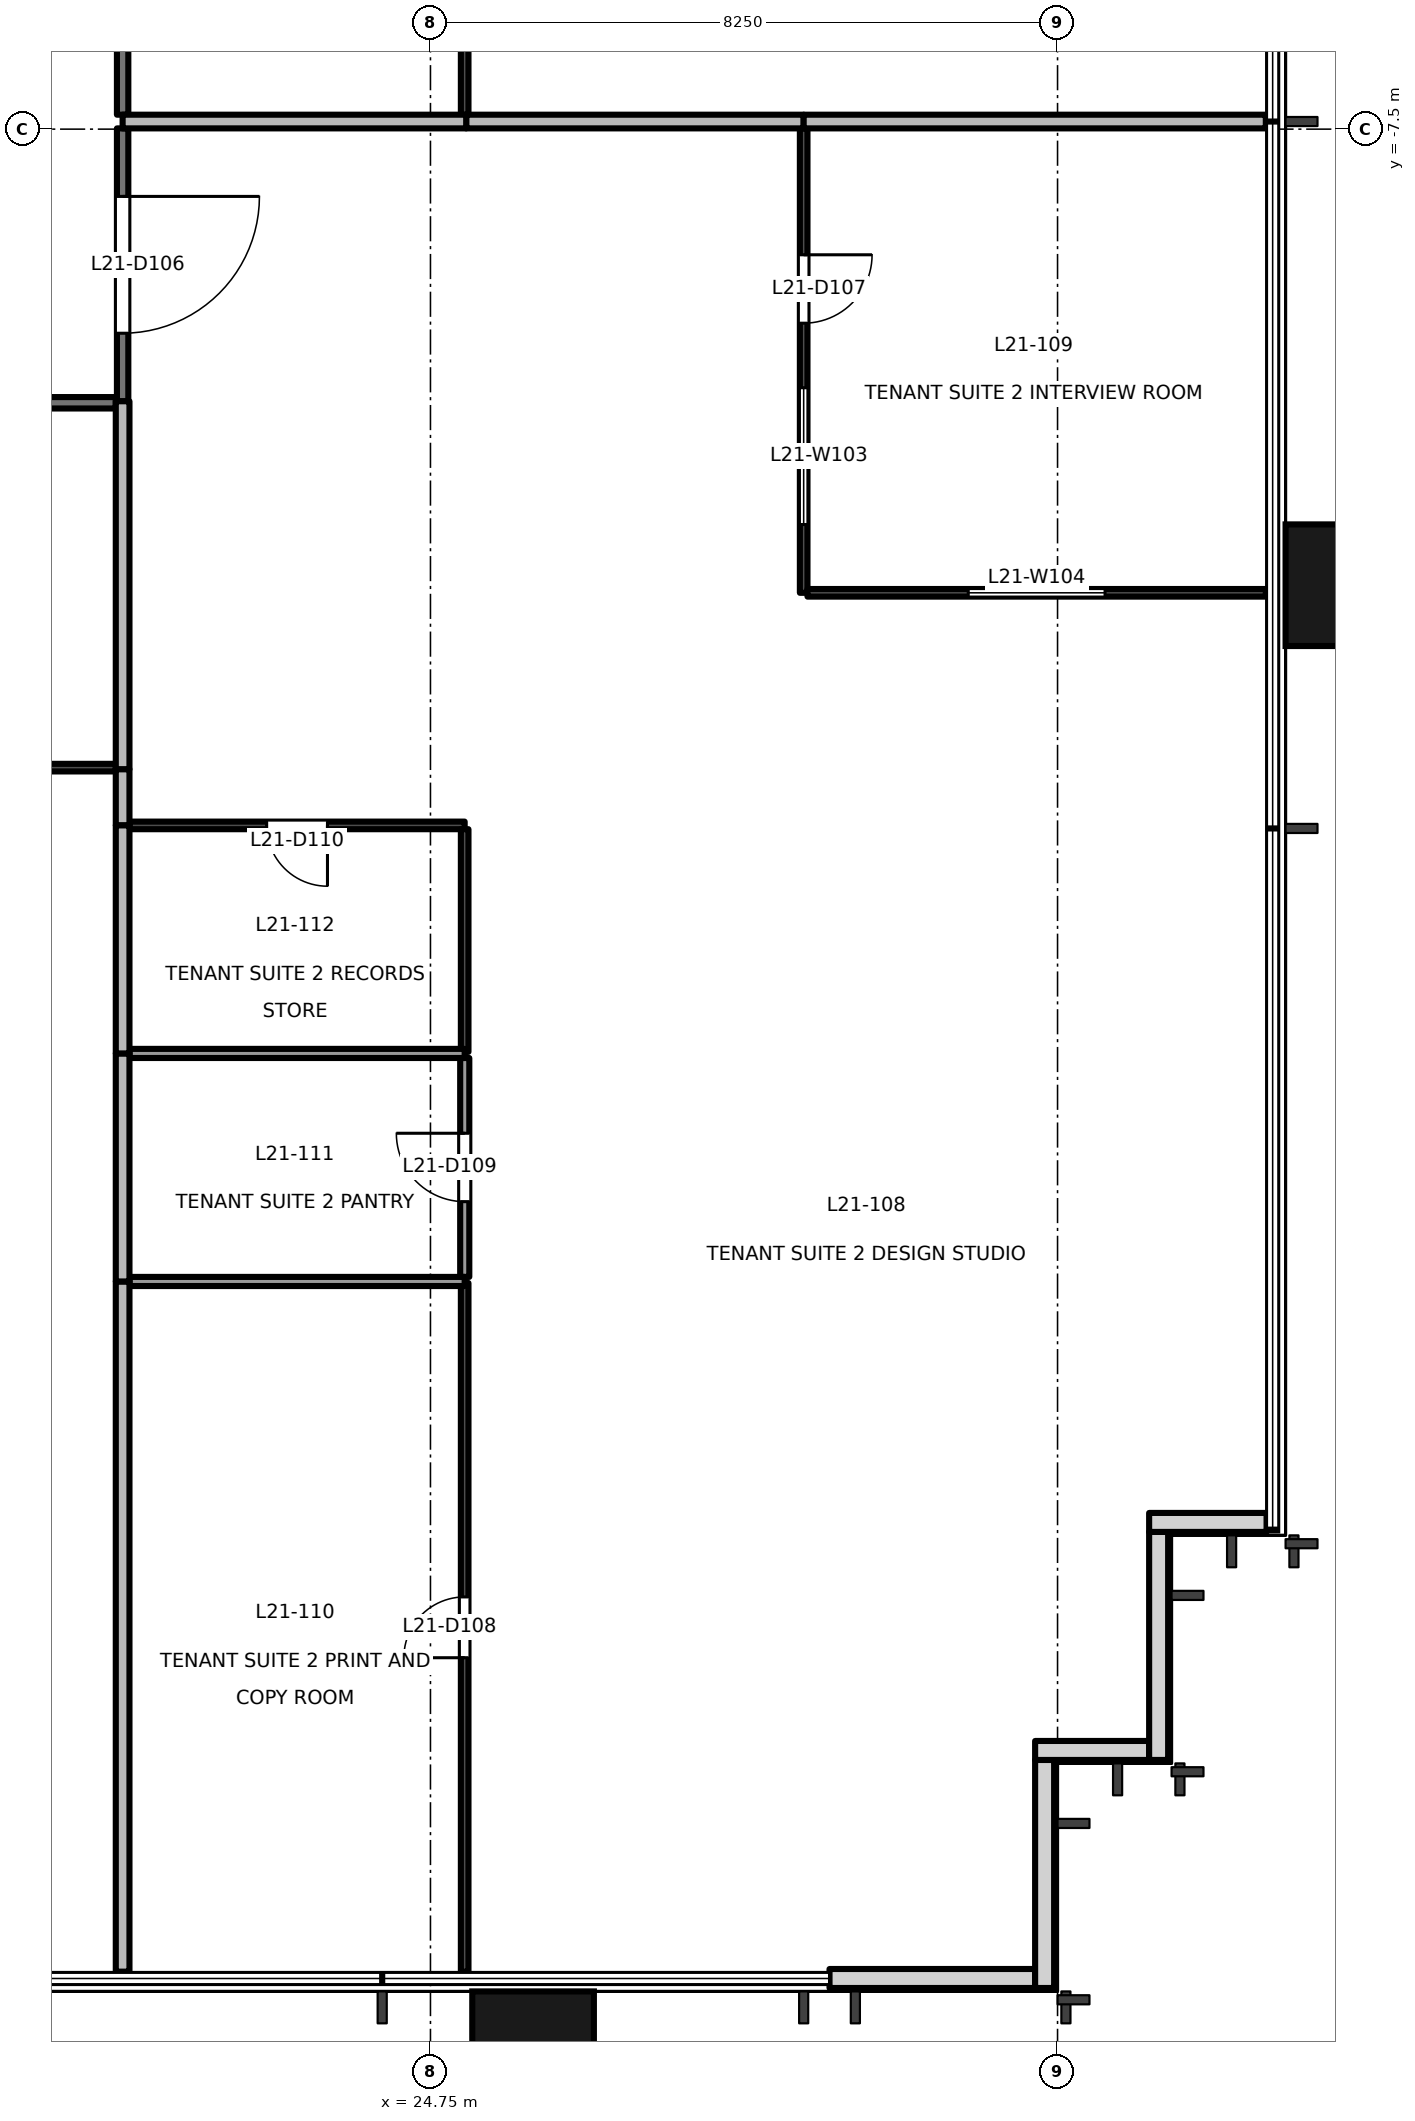
"""IFC4 building model, lengths in metres.
Left out: names, types, materials, properties, quantities, classifications, styles, units other than length and angle.
Written with IfcOpenShell. Run it as: python <this file> out.ifc"""

import sys

from ifc_helpers import new_model, si_unit, direction, frame, frame_2d, origin, origin_2d, place, context, subcontext, project, spatial, rectangle, extrude, element, fill, save


model = new_model("IFC4")
c1 = context("Model", 3, precision=1e-05, world=origin(), true_north=direction((0.0, 1.0)))
c2 = subcontext(c1, "Body", "Model", "MODEL_VIEW")
j1 = project(units=[si_unit("LENGTHUNIT", "METRE"), si_unit("PLANEANGLEUNIT", "RADIAN")], contexts=[c1])
p1 = place(None, origin())
s1 = spatial("IfcSite", under=j1, at=p1, CompositionType="ELEMENT")
p2 = place(p1, origin())
s2 = spatial("IfcBuilding", under=s1, at=p2, CompositionType="ELEMENT")
p3 = place(p2, frame((0.0, 0.0, 95.7)))
s3 = spatial("IfcBuildingStorey", under=s2, at=p3, CompositionType="ELEMENT", Elevation=95.7)
for number, where, z_axis, x_axis in (
    (1, (26.1, -32.9, -0.2), (0.0, 0.0, 1.0), (1.0, 0.0, 0.0)),
    (2, (36.9, -13.5, -0.2), (0.0, 0.0, 1.0), (0.0, 1.0, 0.0)),
):
    element("IfcColumn", number, at=place(p3, frame(where, z_axis=z_axis, x_axis=x_axis)), inside=s3, PredefinedType="COLUMN", context=c2, shape_type="SweptSolid", body=[
        extrude(rectangle(XDim=1.6, YDim=1.8, at=origin_2d()), origin(), (0.0, 0.0, 1.0), 4.0),
    ])
p4 = place(p3, frame((30.0, -31.83, 0.0), z_axis=(0.0, 0.0, 1.0), x_axis=(1.0, 0.0, 0.0)))
e3 = element("IfcWall", 3, at=p4, inside=s3, PredefinedType="SOLIDWALL", context=c2, shape_type="SweptSolid", body=[
    extrude(rectangle(XDim=2.705, YDim=0.25, at=frame_2d((1.353, 0.0))), origin(), (0.0, 0.0, 1.0), 3.8),
])
p5 = place(p3, frame((32.83, -31.955, 0.0), z_axis=(0.0, 0.0, 1.0), x_axis=(0.0, 1.0, 0.0)))
e4 = element("IfcWall", 4, at=p5, inside=s3, PredefinedType="SOLIDWALL", context=c2, shape_type="SweptSolid", body=[
    extrude(rectangle(XDim=3.0, YDim=0.25, at=frame_2d((1.5, 0.0))), origin(), (0.0, 0.0, 1.0), 3.8),
])
p6 = place(p3, frame((32.705, -28.83, 0.0), z_axis=(0.0, 0.0, 1.0), x_axis=(1.0, 0.0, 0.0)))
e5 = element("IfcWall", 5, at=p6, inside=s3, PredefinedType="SOLIDWALL", context=c2, shape_type="SweptSolid", body=[
    extrude(rectangle(XDim=1.5, YDim=0.25, at=frame_2d((0.75, 0.0))), origin(), (0.0, 0.0, 1.0), 3.8),
])
p7 = place(p3, frame((34.33, -28.955, 0.0), z_axis=(0.0, 0.0, 1.0), x_axis=(0.0, 1.0, 0.0)))
e6 = element("IfcWall", 6, at=p7, inside=s3, PredefinedType="SOLIDWALL", context=c2, shape_type="SweptSolid", body=[
    extrude(rectangle(XDim=3.0, YDim=0.25, at=frame_2d((1.5, 0.0))), origin(), (0.0, 0.0, 1.0), 3.8),
])
p8 = place(p3, frame((34.205, -25.83, 0.0), z_axis=(0.0, 0.0, 1.0), x_axis=(1.0, 0.0, 0.0)))
e7 = element("IfcWall", 7, at=p8, inside=s3, PredefinedType="SOLIDWALL", context=c2, shape_type="SweptSolid", body=[
    extrude(rectangle(XDim=1.545, YDim=0.25, at=frame_2d((0.772, 0.0))), origin(), (0.0, 0.0, 1.0), 3.8),
])
p9 = place(p3, frame((20.7, -7.49, 0.0), z_axis=(0.0, 0.0, 1.0), x_axis=(0.0, -1.0, 0.0)))
e8 = element("IfcWall", 8, at=p9, inside=s3, PredefinedType="PARTITIONING", context=c2, shape_type="SweptSolid", body=[
    extrude(rectangle(XDim=3.59, YDim=0.15, at=frame_2d((1.795, 0.0))), origin(), (0.0, 0.0, 1.0), 2.9),
])
p10 = place(p9, frame((0.895, 0.0, 0.0)))
e9 = element("IfcOpeningElement", 9, at=p10, cuts=e8, PredefinedType="OPENING", context=c2, shape_type="SweptSolid", body=[
    extrude(rectangle(XDim=1.8, YDim=2.1, at=frame_2d((0.9, 1.05))), frame((0.0, 0.085, 0.0), z_axis=(0.0, -1.0, 0.0), x_axis=(1.0, 0.0, 0.0)), (0.0, 0.0, 1.0), 0.171),
])
p11 = place(p3, frame((20.7, -3.82, 0.0), z_axis=(0.0, 0.0, 1.0), x_axis=(0.0, -1.0, 0.0)))
e10 = element("IfcWall", 10, at=p11, inside=s3, PredefinedType="PARTITIONING", context=c2, shape_type="SweptSolid", body=[
    extrude(rectangle(XDim=3.49, YDim=0.15, at=frame_2d((1.745, 0.0))), origin(), (0.0, 0.0, 1.0), 2.9),
])
p12 = place(p3, frame((20.61, -11.1, 0.0), z_axis=(0.0, 0.0, 1.0), x_axis=(-1.0, 0.0, 0.0)))
e11 = element("IfcWall", 11, at=p12, inside=s3, PredefinedType="PARTITIONING", context=c2, shape_type="SweptSolid", body=[
    extrude(rectangle(XDim=8.63, YDim=0.15, at=frame_2d((4.315, 0.0))), origin(), (0.0, 0.0, 1.0), 2.4),
])
p13 = place(p3, frame((29.66, -7.49, 0.0), z_axis=(0.0, 0.0, 1.0), x_axis=(0.0, -1.0, 0.0)))
e12 = element("IfcWall", 12, at=p13, inside=s3, PredefinedType="PARTITIONING", context=c2, shape_type="SweptSolid", body=[
    extrude(rectangle(XDim=6.11, YDim=0.1, at=frame_2d((3.055, 0.0))), origin(), (0.0, 0.0, 1.0), 2.9),
])
p14 = place(p13, frame((1.663, 0.0, 0.0)))
e13 = element("IfcOpeningElement", 13, at=p14, cuts=e12, PredefinedType="OPENING", context=c2, shape_type="SweptSolid", body=[
    extrude(rectangle(XDim=0.9, YDim=2.1, at=frame_2d((0.45, 1.05))), frame((0.0, 0.061, 0.0), z_axis=(0.0, -1.0, 0.0), x_axis=(1.0, 0.0, 0.0)), (0.0, 0.0, 1.0), 0.121),
])
p15 = place(p13, frame((3.412, 0.0, 0.9)))
e14 = element("IfcOpeningElement", 14, at=p15, cuts=e12, PredefinedType="OPENING", context=c2, shape_type="SweptSolid", body=[
    extrude(rectangle(XDim=1.8, YDim=1.2, at=frame_2d((0.9, 0.6))), frame((0.0, 0.061, 0.0), z_axis=(0.0, -1.0, 0.0), x_axis=(1.0, 0.0, 0.0)), (0.0, 0.0, 1.0), 0.121),
])
p16 = place(p3, frame((29.71, -13.6, 0.0), z_axis=(0.0, 0.0, 1.0), x_axis=(1.0, 0.0, 0.0)))
e15 = element("IfcWall", 15, at=p16, inside=s3, PredefinedType="PARTITIONING", context=c2, shape_type="SweptSolid", body=[
    extrude(rectangle(XDim=6.03, YDim=0.1, at=frame_2d((3.015, 0.0))), origin(), (0.0, 0.0, 1.0), 2.9),
])
p17 = place(p16, frame((2.115, 0.0, 0.9)))
e16 = element("IfcOpeningElement", 16, at=p17, cuts=e15, PredefinedType="OPENING", context=c2, shape_type="SweptSolid", body=[
    extrude(rectangle(XDim=1.8, YDim=1.2, at=frame_2d((0.9, 0.6))), frame((0.0, 0.061, 0.0), z_axis=(0.0, -1.0, 0.0), x_axis=(1.0, 0.0, 0.0)), (0.0, 0.0, 1.0), 0.121),
])
p18 = place(p3, frame((25.2, -31.74, 0.0), z_axis=(0.0, 0.0, 1.0), x_axis=(0.0, 1.0, 0.0)))
e17 = element("IfcWall", 17, at=p18, inside=s3, PredefinedType="PARTITIONING", context=c2, shape_type="SweptSolid", body=[
    extrude(rectangle(XDim=9.06, YDim=0.1, at=frame_2d((4.53, 0.0))), origin(), (0.0, 0.0, 1.0), 3.8),
])
p19 = place(p18, frame((4.13, 0.0, 0.0)))
e18 = element("IfcOpeningElement", 18, at=p19, cuts=e17, PredefinedType="OPENING", context=c2, shape_type="SweptSolid", body=[
    extrude(rectangle(XDim=0.8, YDim=2.1, at=frame_2d((0.4, 1.05))), frame((0.0, 0.061, 0.0), z_axis=(0.0, -1.0, 0.0), x_axis=(1.0, 0.0, 0.0)), (0.0, 0.0, 1.0), 0.121),
])
p20 = place(p3, frame((25.201, -22.6, 0.0), z_axis=(0.0, 0.0, 1.0), x_axis=(0.0, 1.0, 0.0)))
e19 = element("IfcWall", 19, at=p20, inside=s3, PredefinedType="PARTITIONING", context=c2, shape_type="SweptSolid", body=[
    extrude(rectangle(XDim=2.88, YDim=0.12, at=frame_2d((1.44, 0.0))), origin(), (0.0, 0.0, 1.0), 3.8),
])
p21 = place(p20, frame((0.99, 0.0, 0.0)))
e20 = element("IfcOpeningElement", 20, at=p21, cuts=e19, PredefinedType="OPENING", context=c2, shape_type="SweptSolid", body=[
    extrude(rectangle(XDim=0.9, YDim=2.1, at=frame_2d((0.45, 1.05))), frame((0.0, 0.071, 0.0), z_axis=(0.0, -1.0, 0.0), x_axis=(1.0, 0.0, 0.0)), (0.0, 0.0, 1.0), 0.141),
])
p22 = place(p3, frame((25.2, -16.66, 0.0), z_axis=(0.0, 0.0, 1.0), x_axis=(-1.0, 0.0, 0.0)))
e21 = element("IfcWall", 21, at=p22, inside=s3, PredefinedType="PARTITIONING", context=c2, shape_type="SweptSolid", body=[
    extrude(rectangle(XDim=4.41, YDim=0.1, at=frame_2d((2.205, 0.0))), origin(), (0.0, 0.0, 1.0), 3.8),
])
p23 = place(p22, frame((1.805, 0.0, 0.0)))
e22 = element("IfcOpeningElement", 22, at=p23, cuts=e21, PredefinedType="OPENING", context=c2, shape_type="SweptSolid", body=[
    extrude(rectangle(XDim=0.8, YDim=2.1, at=frame_2d((0.4, 1.05))), frame((0.0, 0.061, 0.0), z_axis=(0.0, -1.0, 0.0), x_axis=(1.0, 0.0, 0.0)), (0.0, 0.0, 1.0), 0.121),
])
p24 = place(p3, frame((25.2, -19.64, 0.0), z_axis=(0.0, 0.0, 1.0), x_axis=(0.0, 1.0, 0.0)))
e23 = element("IfcWall", 23, at=p24, inside=s3, PredefinedType="PARTITIONING", context=c2, shape_type="SweptSolid", body=[
    extrude(rectangle(XDim=2.93, YDim=0.1, at=frame_2d((1.465, 0.0))), origin(), (0.0, 0.0, 1.0), 3.8),
])
p25 = place(p3, frame((25.22, -7.4, 0.0), z_axis=(0.0, 0.0, 1.0), x_axis=(1.0, 0.0, 0.0)))
e24 = element("IfcWall", 24, at=p25, inside=s3, PredefinedType="PARTITIONING", context=c2, shape_type="SweptSolid", body=[
    extrude(rectangle(XDim=4.44, YDim=0.18, at=frame_2d((2.22, 0.0))), origin(), (0.0, 0.0, 1.0), 3.8),
])
p26 = place(p3, frame((20.7, -7.4, 0.0), z_axis=(0.0, 0.0, 1.0), x_axis=(1.0, 0.0, 0.0)))
e25 = element("IfcWall", 25, at=p26, inside=s3, PredefinedType="PARTITIONING", context=c2, shape_type="SweptSolid", body=[
    extrude(rectangle(XDim=4.52, YDim=0.18, at=frame_2d((2.26, 0.0))), origin(), (0.0, 0.0, 1.0), 3.8),
])
p27 = place(p3, frame((20.7, -16.66, 0.0), z_axis=(0.0, 0.0, 1.0), x_axis=(0.0, 1.0, 0.0)))
e26 = element("IfcWall", 26, at=p27, inside=s3, PredefinedType="PARTITIONING", context=c2, shape_type="SweptSolid", body=[
    extrude(rectangle(XDim=0.74, YDim=0.18, at=frame_2d((0.37, 0.0))), origin(), (0.0, 0.0, 1.0), 3.8),
])
p28 = place(p3, frame((20.7, -15.92, 0.0), z_axis=(0.0, 0.0, 1.0), x_axis=(0.0, 1.0, 0.0)))
e27 = element("IfcWall", 27, at=p28, inside=s3, PredefinedType="PARTITIONING", context=c2, shape_type="SweptSolid", body=[
    extrude(rectangle(XDim=4.84, YDim=0.18, at=frame_2d((2.42, 0.0))), origin(), (0.0, 0.0, 1.0), 2.9),
])
p29 = place(p3, frame((29.66, -7.4, 0.0), z_axis=(0.0, 0.0, 1.0), x_axis=(1.0, 0.0, 0.0)))
e28 = element("IfcWall", 28, at=p29, inside=s3, PredefinedType="PARTITIONING", context=c2, shape_type="SweptSolid", body=[
    extrude(rectangle(XDim=6.08, YDim=0.18, at=frame_2d((3.04, 0.0))), origin(), (0.0, 0.0, 1.0), 3.8),
])
p30 = place(p3, frame((20.79, -22.66, 0.0), z_axis=(0.0, 0.0, 1.0), x_axis=(1.0, 0.0, 0.0)))
e29 = element("IfcWall", 29, at=p30, inside=s3, PredefinedType="PARTITIONING", context=c2, shape_type="SweptSolid", body=[
    extrude(rectangle(XDim=4.41, YDim=0.12, at=frame_2d((2.205, 0.0))), origin(), (0.0, 0.0, 1.0), 3.8),
])
p31 = place(p3, frame((20.7, -31.74, 0.0), z_axis=(0.0, 0.0, 1.0), x_axis=(0.0, 1.0, 0.0)))
e30 = element("IfcWall", 30, at=p31, inside=s3, PredefinedType="PARTITIONING", context=c2, shape_type="SweptSolid", body=[
    extrude(rectangle(XDim=9.08, YDim=0.18, at=frame_2d((4.54, 0.0))), origin(), (0.0, 0.0, 1.0), 3.8),
])
p32 = place(p3, frame((20.79, -19.66, 0.0), z_axis=(0.0, 0.0, 1.0), x_axis=(1.0, 0.0, 0.0)))
e31 = element("IfcWall", 31, at=p32, inside=s3, PredefinedType="PARTITIONING", context=c2, shape_type="SweptSolid", body=[
    extrude(rectangle(XDim=4.41, YDim=0.12, at=frame_2d((2.205, 0.0))), origin(), (0.0, 0.0, 1.0), 3.8),
])
for number, where, z_axis, x_axis in (
    (32, (20.7, -22.66, 0.0), (0.0, 0.0, 1.0), (0.0, 1.0, 0.0)),
    (33, (20.7, -19.66, 0.0), (0.0, 0.0, 1.0), (0.0, 1.0, 0.0)),
):
    element("IfcWall", number, at=place(p3, frame(where, z_axis=z_axis, x_axis=x_axis)), inside=s3, PredefinedType="PARTITIONING", context=c2, shape_type="SweptSolid", body=[
        extrude(rectangle(XDim=3.0, YDim=0.18, at=frame_2d((1.5, 0.0))), origin(), (0.0, 0.0, 1.0), 3.8),
    ])
p33 = place(p3, frame((25.2, -7.31, 0.0), z_axis=(0.0, 0.0, 1.0), x_axis=(0.0, 1.0, 0.0)))
e34 = element("IfcWall", 34, at=p33, inside=s3, PredefinedType="PARTITIONING", context=c2, shape_type="SweptSolid", body=[
    extrude(rectangle(XDim=3.49, YDim=0.1, at=frame_2d((1.745, 0.0))), origin(), (0.0, 0.0, 1.0), 2.9),
])
p34 = place(p33, frame((0.877, 0.0, 0.0)))
e35 = element("IfcOpeningElement", 35, at=p34, cuts=e34, PredefinedType="OPENING", context=c2, shape_type="SweptSolid", body=[
    extrude(rectangle(XDim=0.9, YDim=2.1, at=frame_2d((0.45, 1.05))), frame((0.0, 0.061, 0.0), z_axis=(0.0, -1.0, 0.0), x_axis=(1.0, 0.0, 0.0)), (0.0, 0.0, 1.0), 0.121),
])
p35 = place(p3, frame((12.0, -15.9, 0.0), z_axis=(0.0, 0.0, 1.0), x_axis=(1.0, 0.0, 0.0)))
e36 = element("IfcWall", 36, at=p35, inside=s3, PredefinedType="PARTITIONING", context=c2, shape_type="SweptSolid", body=[
    extrude(rectangle(XDim=8.61, YDim=0.1, at=frame_2d((4.305, 0.0))), origin(), (0.0, 0.0, 1.0), 2.4),
])
p36 = place(p35, frame((5.367, 0.0, 0.0)))
e37 = element("IfcOpeningElement", 37, at=p36, cuts=e36, PredefinedType="OPENING", context=c2, shape_type="SweptSolid", body=[
    extrude(rectangle(XDim=0.8, YDim=2.1, at=frame_2d((0.4, 1.05))), frame((0.0, 0.061, 0.0), z_axis=(0.0, -1.0, 0.0), x_axis=(1.0, 0.0, 0.0)), (0.0, 0.0, 1.0), 0.121),
])
p37 = place(p10, origin())
e38 = element("IfcDoor", 38, at=p37, inside=s3, OperationType="DOUBLE_DOOR_SINGLE_SWING", PredefinedType="DOOR", context=c2, shape_type="SweptSolid", body=[
    extrude(rectangle(XDim=1.8, YDim=2.1, at=frame_2d((0.9, 1.05))), frame((0.0, 0.025, 0.0), z_axis=(0.0, -1.0, 0.0), x_axis=(1.0, 0.0, 0.0)), (0.0, 0.0, 1.0), 0.05),
])
fill(e9, e38)
p38 = place(p14, origin())
e39 = element("IfcDoor", 39, at=p38, inside=s3, OperationType="SINGLE_SWING_LEFT", PredefinedType="DOOR", context=c2, shape_type="SweptSolid", body=[
    extrude(rectangle(XDim=0.9, YDim=2.1, at=frame_2d((0.45, 1.05))), frame((0.0, 0.025, 0.0), z_axis=(0.0, -1.0, 0.0), x_axis=(1.0, 0.0, 0.0)), (0.0, 0.0, 1.0), 0.05),
])
fill(e13, e39)
p39 = place(p19, origin())
e40 = element("IfcDoor", 40, at=p39, inside=s3, OperationType="SINGLE_SWING_LEFT", PredefinedType="DOOR", context=c2, shape_type="SweptSolid", body=[
    extrude(rectangle(XDim=0.8, YDim=2.1, at=frame_2d((0.4, 1.05))), frame((0.0, 0.025, 0.0), z_axis=(0.0, -1.0, 0.0), x_axis=(1.0, 0.0, 0.0)), (0.0, 0.0, 1.0), 0.05),
])
fill(e18, e40)
p40 = place(p21, origin())
e41 = element("IfcDoor", 41, at=p40, inside=s3, OperationType="SINGLE_SWING_RIGHT", PredefinedType="DOOR", context=c2, shape_type="SweptSolid", body=[
    extrude(rectangle(XDim=0.9, YDim=2.1, at=frame_2d((0.45, 1.05))), frame((0.0, 0.025, 0.0), z_axis=(0.0, -1.0, 0.0), x_axis=(1.0, 0.0, 0.0)), (0.0, 0.0, 1.0), 0.05),
])
fill(e20, e41)
p41 = place(p23, origin())
e42 = element("IfcDoor", 42, at=p41, inside=s3, OperationType="SINGLE_SWING_LEFT", PredefinedType="DOOR", context=c2, shape_type="SweptSolid", body=[
    extrude(rectangle(XDim=0.8, YDim=2.1, at=frame_2d((0.4, 1.05))), frame((0.0, 0.025, 0.0), z_axis=(0.0, -1.0, 0.0), x_axis=(1.0, 0.0, 0.0)), (0.0, 0.0, 1.0), 0.05),
])
fill(e22, e42)
p42 = place(p15, origin())
e43 = element("IfcWindow", 43, at=p42, inside=s3, PartitioningType="SINGLE_PANEL", PredefinedType="WINDOW", context=c2, shape_type="SweptSolid", body=[
    extrude(rectangle(XDim=1.8, YDim=1.2, at=frame_2d((0.9, 0.6))), frame((0.0, 0.03, 0.0), z_axis=(0.0, -1.0, 0.0), x_axis=(1.0, 0.0, 0.0)), (0.0, 0.0, 1.0), 0.06),
])
fill(e14, e43)
p43 = place(p17, origin())
e44 = element("IfcWindow", 44, at=p43, inside=s3, PartitioningType="SINGLE_PANEL", PredefinedType="WINDOW", context=c2, shape_type="SweptSolid", body=[
    extrude(rectangle(XDim=1.8, YDim=1.2, at=frame_2d((0.9, 0.6))), frame((0.0, 0.03, 0.0), z_axis=(0.0, -1.0, 0.0), x_axis=(1.0, 0.0, 0.0)), (0.0, 0.0, 1.0), 0.06),
])
fill(e16, e44)
save(model, sys.argv[1])
